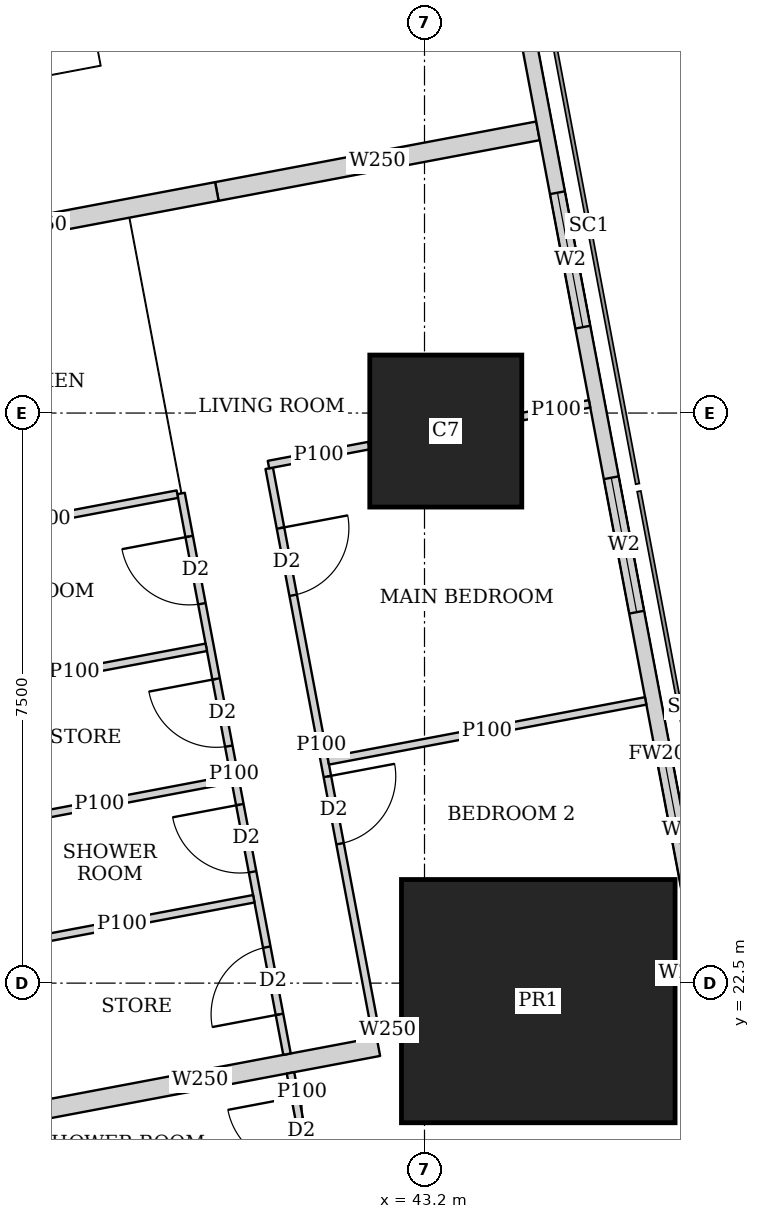
"""IFC4 building model, lengths in metres.
Left out: names, types, materials, properties, quantities, classifications, styles, units other than length and angle.
Written with IfcOpenShell. Run it as: python <this file> out.ifc"""

import sys

from ifc_helpers import new_model, si_unit, direction, frame, frame_2d, origin, origin_2d, place, context, subcontext, project, spatial, rectangle, extrude, element, fill, save


model = new_model("IFC4")
c1 = context("Model", 3, precision=1e-05, world=origin(), true_north=direction((0.0, 1.0)))
c2 = subcontext(c1, "Body", "Model", "MODEL_VIEW")
j1 = project(units=[si_unit("LENGTHUNIT", "METRE"), si_unit("PLANEANGLEUNIT", "RADIAN")], contexts=[c1])
p1 = place(None, origin())
s1 = spatial("IfcSite", under=j1, at=p1, CompositionType="ELEMENT")
p2 = place(p1, origin())
s2 = spatial("IfcBuilding", under=s1, at=p2, CompositionType="ELEMENT")
p3 = place(p2, frame((0.0, 0.0, 259.1)))
s3 = spatial("IfcBuildingStorey", under=s2, at=p3, CompositionType="ELEMENT", Elevation=259.1)
p4 = place(p3, frame((44.697, 22.263, 0.0), z_axis=(0.0, 0.0, 1.0), x_axis=(1.0, 0.0, 0.0)))
e1 = element("IfcColumn", 1, at=p4, inside=s3, PredefinedType="COLUMN", context=c2, shape_type="SweptSolid", body=[
    extrude(rectangle(XDim=3.6, YDim=3.2, at=origin_2d()), origin(), (0.0, 0.0, 1.0), 3.75),
])
p5 = place(p3, frame((43.48, 29.763, 0.0), z_axis=(0.0, 0.0, 1.0), x_axis=(1.0, 0.0, 0.0)))
e2 = element("IfcColumn", 2, at=p5, inside=s3, PredefinedType="COLUMN", context=c2, shape_type="SweptSolid", body=[
    extrude(rectangle(XDim=2.0, YDim=2.0, at=origin_2d()), origin(), (0.0, 0.0, 1.0), 3.75),
])
p6 = place(p3, frame((49.684, 7.832, 0.0), z_axis=(0.0, 0.0, 1.0), x_axis=(-0.185616669694, 0.982622232565, 0.0)))
e3 = element("IfcWall", 3, at=p6, inside=s3, PredefinedType="SOLIDWALL", context=c2, shape_type="SweptSolid", body=[
    extrude(rectangle(XDim=36.0, YDim=0.2, at=frame_2d((18.0, 0.0))), origin(), (0.0, 0.0, 1.0), 3.5),
])
p7 = place(p6, frame((2.518, 0.0, 0.9)))
e4 = element("IfcOpeningElement", 4, at=p7, cuts=e3, PredefinedType="OPENING", context=c2, shape_type="SweptSolid", body=[
    extrude(rectangle(XDim=2.4, YDim=1.5, at=frame_2d((1.2, 0.75))), frame((0.0, 0.11, 0.0), z_axis=(0.0, -1.0, 0.0), x_axis=(1.0, 0.0, 0.0)), (0.0, 0.0, 1.0), 0.22),
])
p8 = place(p6, frame((8.444, 0.0, 0.9)))
e5 = element("IfcOpeningElement", 5, at=p8, cuts=e3, PredefinedType="OPENING", context=c2, shape_type="SweptSolid", body=[
    extrude(rectangle(XDim=1.8, YDim=1.5, at=frame_2d((0.9, 0.75))), frame((0.0, 0.11, 0.0), z_axis=(0.0, -1.0, 0.0), x_axis=(1.0, 0.0, 0.0)), (0.0, 0.0, 1.0), 0.22),
])
p9 = place(p6, frame((12.261, 0.0, 0.9)))
e6 = element("IfcOpeningElement", 6, at=p9, cuts=e3, PredefinedType="OPENING", context=c2, shape_type="SweptSolid", body=[
    extrude(rectangle(XDim=1.8, YDim=1.5, at=frame_2d((0.9, 0.75))), frame((0.0, 0.11, 0.0), z_axis=(0.0, -1.0, 0.0), x_axis=(1.0, 0.0, 0.0)), (0.0, 0.0, 1.0), 0.22),
])
p10 = place(p6, frame((16.078, 0.0, 0.9)))
e7 = element("IfcOpeningElement", 7, at=p10, cuts=e3, PredefinedType="OPENING", context=c2, shape_type="SweptSolid", body=[
    extrude(rectangle(XDim=1.8, YDim=1.5, at=frame_2d((0.9, 0.75))), frame((0.0, 0.11, 0.0), z_axis=(0.0, -1.0, 0.0), x_axis=(1.0, 0.0, 0.0)), (0.0, 0.0, 1.0), 0.22),
])
p11 = place(p6, frame((19.894, 0.0, 0.9)))
e8 = element("IfcOpeningElement", 8, at=p11, cuts=e3, PredefinedType="OPENING", context=c2, shape_type="SweptSolid", body=[
    extrude(rectangle(XDim=1.8, YDim=1.5, at=frame_2d((0.9, 0.75))), frame((0.0, 0.11, 0.0), z_axis=(0.0, -1.0, 0.0), x_axis=(1.0, 0.0, 0.0)), (0.0, 0.0, 1.0), 0.22),
])
p12 = place(p6, frame((23.71, 0.0, 0.9)))
e9 = element("IfcOpeningElement", 9, at=p12, cuts=e3, PredefinedType="OPENING", context=c2, shape_type="SweptSolid", body=[
    extrude(rectangle(XDim=1.8, YDim=1.5, at=frame_2d((0.9, 0.75))), frame((0.0, 0.11, 0.0), z_axis=(0.0, -1.0, 0.0), x_axis=(1.0, 0.0, 0.0)), (0.0, 0.0, 1.0), 0.22),
])
p13 = place(p6, frame((27.526, 0.0, 0.9)))
e10 = element("IfcOpeningElement", 10, at=p13, cuts=e3, PredefinedType="OPENING", context=c2, shape_type="SweptSolid", body=[
    extrude(rectangle(XDim=1.8, YDim=1.5, at=frame_2d((0.9, 0.75))), frame((0.0, 0.11, 0.0), z_axis=(0.0, -1.0, 0.0), x_axis=(1.0, 0.0, 0.0)), (0.0, 0.0, 1.0), 0.22),
])
p14 = place(p6, frame((32.046, 0.0, 0.9)))
e11 = element("IfcOpeningElement", 11, at=p14, cuts=e3, PredefinedType="OPENING", context=c2, shape_type="SweptSolid", body=[
    extrude(rectangle(XDim=1.8, YDim=1.5, at=frame_2d((0.9, 0.75))), frame((0.0, 0.11, 0.0), z_axis=(0.0, -1.0, 0.0), x_axis=(1.0, 0.0, 0.0)), (0.0, 0.0, 1.0), 0.22),
])
p15 = place(p3, frame((33.781, 42.186, 0.0), z_axis=(0.0, 0.0, 1.0), x_axis=(0.185593518645, -0.9826266055, 0.0)))
e12 = element("IfcWall", 12, at=p15, inside=s3, PredefinedType="SOLIDWALL", context=c2, shape_type="SweptSolid", body=[
    extrude(rectangle(XDim=35.961, YDim=0.15, at=frame_2d((17.98, 0.0))), origin(), (0.0, 0.0, 1.0), 2.5),
])
p16 = place(p15, frame((7.183, 0.0, 0.0)))
e13 = element("IfcOpeningElement", 13, at=p16, cuts=e12, PredefinedType="OPENING", context=c2, shape_type="SweptSolid", body=[
    extrude(rectangle(XDim=1.0, YDim=2.1, at=frame_2d((0.5, 1.05))), frame((0.0, 0.085, 0.0), z_axis=(0.0, -1.0, 0.0), x_axis=(1.0, 0.0, 0.0)), (0.0, 0.0, 1.0), 0.17),
])
p17 = place(p15, frame((11.76, 0.0, 0.0)))
e14 = element("IfcOpeningElement", 14, at=p17, cuts=e12, PredefinedType="OPENING", context=c2, shape_type="SweptSolid", body=[
    extrude(rectangle(XDim=1.0, YDim=2.1, at=frame_2d((0.5, 1.05))), frame((0.0, 0.085, 0.0), z_axis=(0.0, -1.0, 0.0), x_axis=(1.0, 0.0, 0.0)), (0.0, 0.0, 1.0), 0.17),
])
p18 = place(p15, frame((23.863, 0.0, 0.0)))
e15 = element("IfcOpeningElement", 15, at=p18, cuts=e12, PredefinedType="OPENING", context=c2, shape_type="SweptSolid", body=[
    extrude(rectangle(XDim=1.0, YDim=2.1, at=frame_2d((0.5, 1.05))), frame((0.0, 0.085, 0.0), z_axis=(0.0, -1.0, 0.0), x_axis=(1.0, 0.0, 0.0)), (0.0, 0.0, 1.0), 0.17),
])
p19 = place(p15, frame((30.502, 0.0, 0.0)))
e16 = element("IfcOpeningElement", 16, at=p19, cuts=e12, PredefinedType="OPENING", context=c2, shape_type="SweptSolid", body=[
    extrude(rectangle(XDim=1.0, YDim=2.1, at=frame_2d((0.5, 1.05))), frame((0.0, 0.085, 0.0), z_axis=(0.0, -1.0, 0.0), x_axis=(1.0, 0.0, 0.0)), (0.0, 0.0, 1.0), 0.17),
])
p20 = place(p3, frame((41.157, 29.273, 0.0), z_axis=(0.0, 0.0, 1.0), x_axis=(0.18542464283, -0.982658486877, 0.0)))
e17 = element("IfcWall", 17, at=p20, inside=s3, PredefinedType="PARTITIONING", context=c2, shape_type="SweptSolid", body=[
    extrude(rectangle(XDim=7.421, YDim=0.1, at=frame_2d((3.71, 0.0))), origin(), (0.0, 0.0, 1.0), 2.5),
])
p21 = place(p20, frame((0.8, 0.0, 0.0)))
e18 = element("IfcOpeningElement", 18, at=p21, cuts=e17, PredefinedType="OPENING", context=c2, shape_type="SweptSolid", body=[
    extrude(rectangle(XDim=0.9, YDim=2.1, at=frame_2d((0.45, 1.05))), frame((0.0, 0.06, 0.0), z_axis=(0.0, -1.0, 0.0), x_axis=(1.0, 0.0, 0.0)), (0.0, 0.0, 1.0), 0.12),
])
p22 = place(p20, frame((4.126, 0.0, 0.0)))
e19 = element("IfcOpeningElement", 19, at=p22, cuts=e17, PredefinedType="OPENING", context=c2, shape_type="SweptSolid", body=[
    extrude(rectangle(XDim=0.9, YDim=2.1, at=frame_2d((0.45, 1.05))), frame((0.0, 0.06, 0.0), z_axis=(0.0, -1.0, 0.0), x_axis=(1.0, 0.0, 0.0)), (0.0, 0.0, 1.0), 0.12),
])
p23 = place(p3, frame((39.997, 28.942, 0.0), z_axis=(0.0, 0.0, 1.0), x_axis=(0.185686318797, -0.982609073341, 0.0)))
e20 = element("IfcWall", 20, at=p23, inside=s3, PredefinedType="PARTITIONING", context=c2, shape_type="SweptSolid", body=[
    extrude(rectangle(XDim=7.508, YDim=0.1, at=frame_2d((3.754, 0.0))), origin(), (0.0, 0.0, 1.0), 2.5),
])
p24 = place(p23, frame((0.576, 0.0, 0.0)))
e21 = element("IfcOpeningElement", 21, at=p24, cuts=e20, PredefinedType="OPENING", context=c2, shape_type="SweptSolid", body=[
    extrude(rectangle(XDim=0.9, YDim=2.1, at=frame_2d((0.45, 1.05))), frame((0.0, 0.06, 0.0), z_axis=(0.0, -1.0, 0.0), x_axis=(1.0, 0.0, 0.0)), (0.0, 0.0, 1.0), 0.12),
])
p25 = place(p23, frame((4.166, 0.0, 0.0)))
e22 = element("IfcOpeningElement", 22, at=p25, cuts=e20, PredefinedType="OPENING", context=c2, shape_type="SweptSolid", body=[
    extrude(rectangle(XDim=0.9, YDim=2.1, at=frame_2d((0.45, 1.05))), frame((0.0, 0.06, 0.0), z_axis=(0.0, -1.0, 0.0), x_axis=(1.0, 0.0, 0.0)), (0.0, 0.0, 1.0), 0.12),
])
p26 = place(p23, frame((2.483, 0.0, 0.0)))
e23 = element("IfcOpeningElement", 23, at=p26, cuts=e20, PredefinedType="OPENING", context=c2, shape_type="SweptSolid", body=[
    extrude(rectangle(XDim=0.9, YDim=2.1, at=frame_2d((0.45, 1.05))), frame((0.0, 0.06, 0.0), z_axis=(0.0, -1.0, 0.0), x_axis=(1.0, 0.0, 0.0)), (0.0, 0.0, 1.0), 0.12),
])
p27 = place(p23, frame((6.074, 0.0, 0.0)))
e24 = element("IfcOpeningElement", 24, at=p27, cuts=e20, PredefinedType="OPENING", context=c2, shape_type="SweptSolid", body=[
    extrude(rectangle(XDim=0.9, YDim=2.1, at=frame_2d((0.45, 1.05))), frame((0.0, 0.06, 0.0), z_axis=(0.0, -1.0, 0.0), x_axis=(1.0, 0.0, 0.0)), (0.0, 0.0, 1.0), 0.12),
])
p28 = place(p3, frame((45.372, 30.121, 0.0), z_axis=(0.0, 0.0, 1.0), x_axis=(-0.982547416156, -0.186012297994, 0.0)))
e25 = element("IfcWall", 25, at=p28, inside=s3, PredefinedType="PARTITIONING", context=c2, shape_type="SweptSolid", body=[
    extrude(rectangle(XDim=0.898, YDim=0.1, at=frame_2d((0.449, 0.0))), origin(), (0.0, 0.0, 1.0), 3.5),
])
p29 = place(p3, frame((42.47, 29.572, 0.0), z_axis=(0.0, 0.0, 1.0), x_axis=(-0.982610503289, -0.185678751683, 0.0)))
e26 = element("IfcWall", 26, at=p29, inside=s3, PredefinedType="PARTITIONING", context=c2, shape_type="SweptSolid", body=[
    extrude(rectangle(XDim=1.346, YDim=0.1, at=frame_2d((0.673, 0.0))), origin(), (0.0, 0.0, 1.0), 2.5),
])
p30 = place(p3, frame((46.11, 26.213, 0.0), z_axis=(0.0, 0.0, 1.0), x_axis=(-0.982623519589, -0.185609856287, 0.0)))
e27 = element("IfcWall", 27, at=p30, inside=s3, PredefinedType="PARTITIONING", context=c2, shape_type="SweptSolid", body=[
    extrude(rectangle(XDim=4.25, YDim=0.1, at=frame_2d((2.125, 0.0))), origin(), (0.0, 0.0, 1.0), 2.5),
])
p31 = place(p3, frame((39.948, 28.933, 0.0), z_axis=(0.0, 0.0, 1.0), x_axis=(-0.982588017646, -0.185797706064, 0.0)))
e28 = element("IfcWall", 28, at=p31, inside=s3, PredefinedType="PARTITIONING", context=c2, shape_type="SweptSolid", body=[
    extrude(rectangle(XDim=3.525, YDim=0.1, at=frame_2d((1.763, 0.0))), origin(), (0.0, 0.0, 1.0), 3.5),
])
p32 = place(p3, frame((40.656, 25.183, 0.0), z_axis=(0.0, 0.0, 1.0), x_axis=(-0.982576058723, -0.185860939478, 0.0)))
e29 = element("IfcWall", 29, at=p32, inside=s3, PredefinedType="PARTITIONING", context=c2, shape_type="SweptSolid", body=[
    extrude(rectangle(XDim=3.524, YDim=0.1, at=frame_2d((1.762, 0.0))), origin(), (0.0, 0.0, 1.0), 3.5),
])
p33 = place(p3, frame((40.329, 26.918, 0.0), z_axis=(0.0, 0.0, 1.0), x_axis=(-0.982638553676, -0.185530247748, 0.0)))
e30 = element("IfcWall", 30, at=p33, inside=s3, PredefinedType="PARTITIONING", context=c2, shape_type="SweptSolid", body=[
    extrude(rectangle(XDim=3.525, YDim=0.1, at=frame_2d((1.763, 0.0))), origin(), (0.0, 0.0, 1.0), 3.5),
])
p34 = place(p3, frame((40.954, 23.61, 0.0), z_axis=(0.0, 0.0, 1.0), x_axis=(-0.98264808502, -0.18547975902, 0.0)))
e31 = element("IfcWall", 31, at=p34, inside=s3, PredefinedType="PARTITIONING", context=c2, shape_type="SweptSolid", body=[
    extrude(rectangle(XDim=3.526, YDim=0.1, at=frame_2d((1.763, 0.0))), origin(), (0.0, 0.0, 1.0), 2.5),
])
p35 = place(p3, frame((44.693, 33.713, 0.0), z_axis=(0.0, 0.0, 1.0), x_axis=(-0.982633535512, -0.185556823879, 0.0)))
e32 = element("IfcWall", 32, at=p35, inside=s3, PredefinedType="SOLIDWALL", context=c2, shape_type="SweptSolid", body=[
    extrude(rectangle(XDim=4.3, YDim=0.25, at=frame_2d((2.15, 0.0))), origin(), (0.0, 0.0, 1.0), 2.5),
])
p36 = place(p3, frame((40.468, 32.915, 0.0), z_axis=(0.0, 0.0, 1.0), x_axis=(-0.982635807605, -0.185544791394, 0.0)))
e33 = element("IfcWall", 33, at=p36, inside=s3, PredefinedType="SOLIDWALL", context=c2, shape_type="SweptSolid", body=[
    extrude(rectangle(XDim=4.775, YDim=0.25, at=frame_2d((2.388, 0.0))), origin(), (0.0, 0.0, 1.0), 3.5),
])
p37 = place(p3, frame((41.437, 21.319, 0.0), z_axis=(0.0, 0.0, 1.0), x_axis=(0.185793689589, -0.982588777113, 0.0)))
e34 = element("IfcWall", 34, at=p37, inside=s3, PredefinedType="PARTITIONING", context=c2, shape_type="SweptSolid", body=[
    extrude(rectangle(XDim=1.625, YDim=0.1, at=frame_2d((0.813, 0.0))), origin(), (0.0, 0.0, 1.0), 3.5),
])
p38 = place(p37, frame((0.325, 0.0, 0.0)))
e35 = element("IfcOpeningElement", 35, at=p38, cuts=e34, PredefinedType="OPENING", context=c2, shape_type="SweptSolid", body=[
    extrude(rectangle(XDim=0.9, YDim=2.1, at=frame_2d((0.45, 1.05))), frame((0.0, 0.06, 0.0), z_axis=(0.0, -1.0, 0.0), x_axis=(1.0, 0.0, 0.0)), (0.0, 0.0, 1.0), 0.12),
])
p39 = place(p3, frame((46.782, 22.657, 0.0), z_axis=(0.0, 0.0, 1.0), x_axis=(-0.982104607121, -0.188336243648, 0.0)))
e36 = element("IfcWall", 36, at=p39, inside=s3, PredefinedType="SOLIDWALL", context=c2, shape_type="SweptSolid", body=[
    extrude(rectangle(XDim=0.266, YDim=0.25, at=frame_2d((0.133, 0.0))), origin(), (0.0, 0.0, 1.0), 3.5),
])
p40 = place(p3, frame((42.873, 21.918, 0.0), z_axis=(0.0, 0.0, 1.0), x_axis=(-0.982431406936, -0.186624035603, 0.0)))
e37 = element("IfcWall", 37, at=p40, inside=s3, PredefinedType="SOLIDWALL", context=c2, shape_type="SweptSolid", body=[
    extrude(rectangle(XDim=0.322, YDim=0.25, at=frame_2d((0.161, 0.0))), origin(), (0.0, 0.0, 1.0), 2.5),
])
p41 = place(p3, frame((42.593, 21.665, 0.0), z_axis=(0.0, 0.0, 1.0), x_axis=(-0.982635807605, -0.185544791394, 0.0)))
e38 = element("IfcWall", 38, at=p41, inside=s3, PredefinedType="SOLIDWALL", context=c2, shape_type="SweptSolid", body=[
    extrude(rectangle(XDim=4.775, YDim=0.25, at=frame_2d((2.388, 0.0))), origin(), (0.0, 0.0, 1.0), 2.5),
])
p42 = place(p10, origin())
e39 = element("IfcWindow", 39, at=p42, inside=s3, PartitioningType="SINGLE_PANEL", PredefinedType="WINDOW", context=c2, shape_type="SweptSolid", body=[
    extrude(rectangle(XDim=1.8, YDim=1.5, at=frame_2d((0.9, 0.75))), frame((0.0, 0.03, 0.0), z_axis=(0.0, -1.0, 0.0), x_axis=(1.0, 0.0, 0.0)), (0.0, 0.0, 1.0), 0.06),
])
fill(e7, e39)
p43 = place(p11, origin())
e40 = element("IfcWindow", 40, at=p43, inside=s3, PartitioningType="SINGLE_PANEL", PredefinedType="WINDOW", context=c2, shape_type="SweptSolid", body=[
    extrude(rectangle(XDim=1.8, YDim=1.5, at=frame_2d((0.9, 0.75))), frame((0.0, 0.03, 0.0), z_axis=(0.0, -1.0, 0.0), x_axis=(1.0, 0.0, 0.0)), (0.0, 0.0, 1.0), 0.06),
])
fill(e8, e40)
p44 = place(p12, origin())
e41 = element("IfcWindow", 41, at=p44, inside=s3, PartitioningType="SINGLE_PANEL", PredefinedType="WINDOW", context=c2, shape_type="SweptSolid", body=[
    extrude(rectangle(XDim=1.8, YDim=1.5, at=frame_2d((0.9, 0.75))), frame((0.0, 0.03, 0.0), z_axis=(0.0, -1.0, 0.0), x_axis=(1.0, 0.0, 0.0)), (0.0, 0.0, 1.0), 0.06),
])
fill(e9, e41)
p45 = place(p21, origin())
e42 = element("IfcDoor", 42, at=p45, inside=s3, OperationType="SINGLE_SWING_LEFT", PredefinedType="DOOR", context=c2, shape_type="SweptSolid", body=[
    extrude(rectangle(XDim=0.9, YDim=2.1, at=frame_2d((0.45, 1.05))), frame((0.0, 0.025, 0.0), z_axis=(0.0, -1.0, 0.0), x_axis=(1.0, 0.0, 0.0)), (0.0, 0.0, 1.0), 0.05),
])
fill(e18, e42)
p46 = place(p22, origin())
e43 = element("IfcDoor", 43, at=p46, inside=s3, OperationType="SINGLE_SWING_LEFT", PredefinedType="DOOR", context=c2, shape_type="SweptSolid", body=[
    extrude(rectangle(XDim=0.9, YDim=2.1, at=frame_2d((0.45, 1.05))), frame((0.0, 0.025, 0.0), z_axis=(0.0, -1.0, 0.0), x_axis=(1.0, 0.0, 0.0)), (0.0, 0.0, 1.0), 0.05),
])
fill(e19, e43)
p47 = place(p24, origin())
e44 = element("IfcDoor", 44, at=p47, inside=s3, OperationType="SINGLE_SWING_RIGHT", PredefinedType="DOOR", context=c2, shape_type="SweptSolid", body=[
    extrude(rectangle(XDim=0.9, YDim=2.1, at=frame_2d((0.45, 1.05))), frame((0.0, 0.025, 0.0), z_axis=(0.0, -1.0, 0.0), x_axis=(1.0, 0.0, 0.0)), (0.0, 0.0, 1.0), 0.05),
])
fill(e21, e44)
p48 = place(p25, origin())
e45 = element("IfcDoor", 45, at=p48, inside=s3, OperationType="SINGLE_SWING_RIGHT", PredefinedType="DOOR", context=c2, shape_type="SweptSolid", body=[
    extrude(rectangle(XDim=0.9, YDim=2.1, at=frame_2d((0.45, 1.05))), frame((0.0, 0.025, 0.0), z_axis=(0.0, -1.0, 0.0), x_axis=(1.0, 0.0, 0.0)), (0.0, 0.0, 1.0), 0.05),
])
fill(e22, e45)
p49 = place(p26, origin())
e46 = element("IfcDoor", 46, at=p49, inside=s3, OperationType="SINGLE_SWING_RIGHT", PredefinedType="DOOR", context=c2, shape_type="SweptSolid", body=[
    extrude(rectangle(XDim=0.9, YDim=2.1, at=frame_2d((0.45, 1.05))), frame((0.0, 0.025, 0.0), z_axis=(0.0, -1.0, 0.0), x_axis=(1.0, 0.0, 0.0)), (0.0, 0.0, 1.0), 0.05),
])
fill(e23, e46)
p50 = place(p27, origin())
e47 = element("IfcDoor", 47, at=p50, inside=s3, OperationType="SINGLE_SWING_LEFT", PredefinedType="DOOR", context=c2, shape_type="SweptSolid", body=[
    extrude(rectangle(XDim=0.9, YDim=2.1, at=frame_2d((0.45, 1.05))), frame((0.0, 0.025, 0.0), z_axis=(0.0, -1.0, 0.0), x_axis=(1.0, 0.0, 0.0)), (0.0, 0.0, 1.0), 0.05),
])
fill(e24, e47)
p51 = place(p38, origin())
e48 = element("IfcDoor", 48, at=p51, inside=s3, OperationType="SINGLE_SWING_RIGHT", PredefinedType="DOOR", context=c2, shape_type="SweptSolid", body=[
    extrude(rectangle(XDim=0.9, YDim=2.1, at=frame_2d((0.45, 1.05))), frame((0.0, 0.025, 0.0), z_axis=(0.0, -1.0, 0.0), x_axis=(1.0, 0.0, 0.0)), (0.0, 0.0, 1.0), 0.05),
])
fill(e35, e48)
save(model, sys.argv[1])
